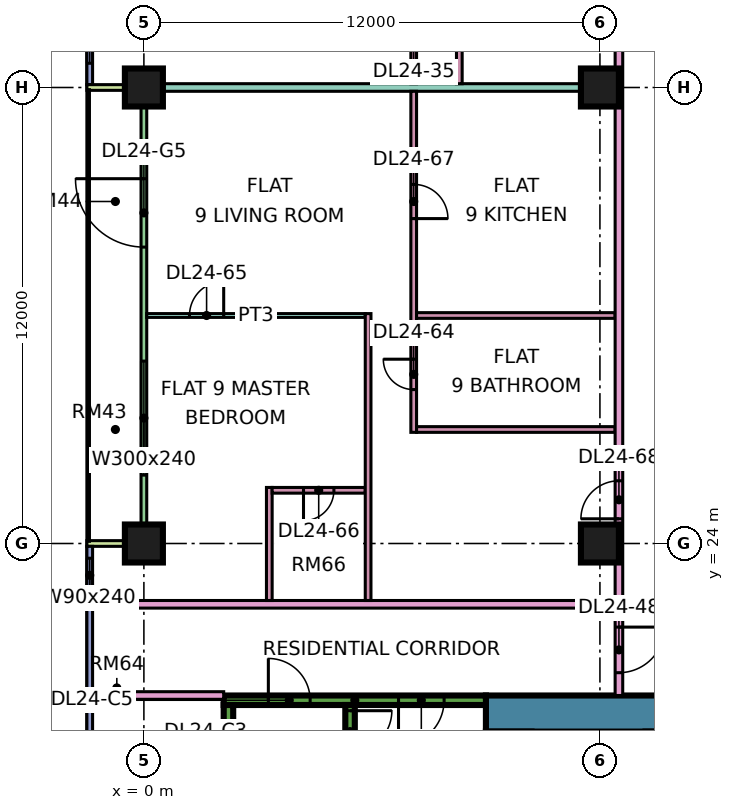
"""IFC4 building model, lengths in metres.
Left out: names, types, materials, properties, quantities, classifications, styles, units other than length and angle.
Written with IfcOpenShell. Run it as: python <this file> out.ifc"""

import sys

from ifc_helpers import new_model, si_unit, direction, frame, frame_2d, origin, origin_2d, place, context, subcontext, project, spatial, rectangle, extrude, element, fill, save


model = new_model("IFC4")
c1 = context("Model", 3, precision=1e-05, world=origin(), true_north=direction((0.0, 1.0)))
c2 = subcontext(c1, "Body", "Model", "MODEL_VIEW")
j1 = project(units=[si_unit("LENGTHUNIT", "METRE"), si_unit("PLANEANGLEUNIT", "RADIAN")], contexts=[c1])
p1 = place(None, origin())
s1 = spatial("IfcSite", under=j1, at=p1, CompositionType="ELEMENT")
p2 = place(p1, origin())
s2 = spatial("IfcBuilding", under=s1, at=p2, CompositionType="ELEMENT")
p3 = place(p2, frame((0.0, 0.0, 106.9)))
s3 = spatial("IfcBuildingStorey", under=s2, at=p3, CompositionType="ELEMENT", Elevation=106.9)
p4 = place(p3, frame((0.0, 24.0, 0.0), z_axis=(0.0, 0.0, 1.0), x_axis=(1.0, 0.0, 0.0)))
e1 = element("IfcColumn", 1, at=p4, inside=s3, PredefinedType="COLUMN", context=c2, shape_type="SweptSolid", body=[
    extrude(rectangle(XDim=1.0, YDim=1.0, at=origin_2d()), origin(), (0.0, 0.0, 1.0), 3.75),
])
p5 = place(p3, frame((0.0, 36.0, 0.0), z_axis=(0.0, 0.0, 1.0), x_axis=(1.0, 0.0, 0.0)))
e2 = element("IfcColumn", 2, at=p5, inside=s3, PredefinedType="COLUMN", context=c2, shape_type="SweptSolid", body=[
    extrude(rectangle(XDim=1.0, YDim=1.0, at=origin_2d()), origin(), (0.0, 0.0, 1.0), 3.75),
])
for number, where, z_axis, x_axis in (
    (3, (12.0, 24.0, 0.0), (0.0, 0.0, 1.0), (1.0, 0.0, 0.0)),
    (4, (12.0, 36.0, 0.0), (0.0, 0.0, 1.0), (1.0, 0.0, 0.0)),
):
    element("IfcColumn", number, at=place(p3, frame(where, z_axis=z_axis, x_axis=x_axis)), inside=s3, PredefinedType="COLUMN", context=c2, shape_type="SweptSolid", body=[
        extrude(rectangle(XDim=1.0, YDim=1.0, at=origin_2d()), origin(), (0.0, 0.0, 1.0), 3.75),
    ])
p6 = place(p3, frame((9.0, 19.525, 0.0), z_axis=(0.0, 0.0, 1.0), x_axis=(1.0, 0.0, 0.0)))
e5 = element("IfcWall", 5, at=p6, inside=s3, PredefinedType="SHEAR", context=c2, shape_type="SweptSolid", body=[
    extrude(rectangle(XDim=25.0, YDim=0.95, at=frame_2d((12.5, 0.0))), origin(), (0.0, 0.0, 1.0), 3.75),
])
p7 = place(p6, frame((19.1, 0.0, 0.0)))
e6 = element("IfcOpeningElement", 6, at=p7, cuts=e5, PredefinedType="OPENING", context=c2, shape_type="SweptSolid", body=[
    extrude(rectangle(XDim=1.8, YDim=2.4, at=frame_2d((0.9, 1.2))), frame((0.0, 0.485, 0.0), z_axis=(0.0, -1.0, 0.0), x_axis=(1.0, 0.0, 0.0)), (0.0, 0.0, 1.0), 0.97),
])
p8 = place(p3, frame((2.1, 19.875, 0.0), z_axis=(0.0, 0.0, 1.0), x_axis=(1.0, 0.0, 0.0)))
e7 = element("IfcWall", 7, at=p8, inside=s3, PredefinedType="SHEAR", context=c2, shape_type="SweptSolid", body=[
    extrude(rectangle(XDim=6.9, YDim=0.25, at=frame_2d((3.45, 0.0))), origin(), (0.0, 0.0, 1.0), 3.75),
])
p9 = place(p8, frame((1.175, 0.0, 0.0)))
e8 = element("IfcOpeningElement", 8, at=p9, cuts=e7, PredefinedType="OPENING", context=c2, shape_type="SweptSolid", body=[
    extrude(rectangle(XDim=1.1, YDim=2.2, at=frame_2d((0.55, 1.1))), frame((0.0, 0.135, 0.0), z_axis=(0.0, -1.0, 0.0), x_axis=(1.0, 0.0, 0.0)), (0.0, 0.0, 1.0), 0.27),
])
p10 = place(p8, frame((4.6, 0.0, 0.0)))
e9 = element("IfcOpeningElement", 9, at=p10, cuts=e7, PredefinedType="OPENING", context=c2, shape_type="SweptSolid", body=[
    extrude(rectangle(XDim=1.2, YDim=2.2, at=frame_2d((0.6, 1.1))), frame((0.0, 0.135, 0.0), z_axis=(0.0, -1.0, 0.0), x_axis=(1.0, 0.0, 0.0)), (0.0, 0.0, 1.0), 0.27),
])
p11 = place(p3, frame((2.225, 13.25, 0.0), z_axis=(0.0, 0.0, 1.0), x_axis=(0.0, 1.0, 0.0)))
e10 = element("IfcWall", 10, at=p11, inside=s3, PredefinedType="SHEAR", context=c2, shape_type="SweptSolid", body=[
    extrude(rectangle(XDim=6.5, YDim=0.25, at=frame_2d((3.25, 0.0))), origin(), (0.0, 0.0, 1.0), 3.75),
])
p12 = place(p3, frame((5.425, 13.25, 0.0), z_axis=(0.0, 0.0, 1.0), x_axis=(0.0, 1.0, 0.0)))
e11 = element("IfcWall", 11, at=p12, inside=s3, PredefinedType="SHEAR", context=c2, shape_type="SweptSolid", body=[
    extrude(rectangle(XDim=6.5, YDim=0.25, at=frame_2d((3.25, 0.0))), origin(), (0.0, 0.0, 1.0), 3.75),
])
p13 = place(p12, frame((5.25, 0.0, 0.0)))
e12 = element("IfcOpeningElement", 12, at=p13, cuts=e11, PredefinedType="OPENING", context=c2, shape_type="SweptSolid", body=[
    extrude(rectangle(XDim=1.1, YDim=2.2, at=frame_2d((0.55, 1.1))), frame((0.0, 0.135, 0.0), z_axis=(0.0, -1.0, 0.0), x_axis=(1.0, 0.0, 0.0)), (0.0, 0.0, 1.0), 0.27),
])
p14 = place(p3, frame((-1.425, 47.925, 0.0), z_axis=(0.0, 0.0, 1.0), x_axis=(0.0, -1.0, 0.0)))
e13 = element("IfcWall", 13, at=p14, inside=s3, PredefinedType="SOLIDWALL", context=c2, shape_type="SweptSolid", body=[
    extrude(rectangle(XDim=11.85, YDim=0.15, at=frame_2d((5.925, 0.0))), origin(), (0.0, 0.0, 1.0), 3.35),
])
p15 = place(p14, frame((0.562, 0.0, 0.45)))
e14 = element("IfcOpeningElement", 14, at=p15, cuts=e13, PredefinedType="OPENING", context=c2, shape_type="SweptSolid", body=[
    extrude(rectangle(XDim=1.8, YDim=2.4, at=frame_2d((0.9, 1.2))), frame((0.0, 0.085, 0.0), z_axis=(0.0, -1.0, 0.0), x_axis=(1.0, 0.0, 0.0)), (0.0, 0.0, 1.0), 0.17),
])
p16 = place(p14, frame((4.425, 0.0, 0.45)))
e15 = element("IfcOpeningElement", 15, at=p16, cuts=e13, PredefinedType="OPENING", context=c2, shape_type="SweptSolid", body=[
    extrude(rectangle(XDim=3.0, YDim=2.4, at=frame_2d((1.5, 1.2))), frame((0.0, 0.085, 0.0), z_axis=(0.0, -1.0, 0.0), x_axis=(1.0, 0.0, 0.0)), (0.0, 0.0, 1.0), 0.17),
])
p17 = place(p14, frame((9.488, 0.0, 0.45)))
e16 = element("IfcOpeningElement", 16, at=p17, cuts=e13, PredefinedType="OPENING", context=c2, shape_type="SweptSolid", body=[
    extrude(rectangle(XDim=1.8, YDim=2.4, at=frame_2d((0.9, 1.2))), frame((0.0, 0.085, 0.0), z_axis=(0.0, -1.0, 0.0), x_axis=(1.0, 0.0, 0.0)), (0.0, 0.0, 1.0), 0.17),
])
p18 = place(p3, frame((0.0, 35.925, 0.0), z_axis=(0.0, 0.0, 1.0), x_axis=(0.0, -1.0, 0.0)))
e17 = element("IfcWall", 17, at=p18, inside=s3, PredefinedType="SOLIDWALL", context=c2, shape_type="SweptSolid", body=[
    extrude(rectangle(XDim=11.85, YDim=0.15, at=frame_2d((5.925, 0.0))), origin(), (0.0, 0.0, 1.0), 3.35),
])
p19 = place(p18, frame((2.325, 0.0, 0.0)))
e18 = element("IfcOpeningElement", 18, at=p19, cuts=e17, PredefinedType="OPENING", context=c2, shape_type="SweptSolid", body=[
    extrude(rectangle(XDim=1.8, YDim=2.4, at=frame_2d((0.9, 1.2))), frame((0.0, 0.085, 0.0), z_axis=(0.0, -1.0, 0.0), x_axis=(1.0, 0.0, 0.0)), (0.0, 0.0, 1.0), 0.17),
])
p20 = place(p18, frame((7.125, 0.0, 0.45)))
e19 = element("IfcOpeningElement", 19, at=p20, cuts=e17, PredefinedType="OPENING", context=c2, shape_type="SweptSolid", body=[
    extrude(rectangle(XDim=3.0, YDim=2.4, at=frame_2d((1.5, 1.2))), frame((0.0, 0.085, 0.0), z_axis=(0.0, -1.0, 0.0), x_axis=(1.0, 0.0, 0.0)), (0.0, 0.0, 1.0), 0.17),
])
for number, where, z_axis, x_axis in (
    (20, (-1.5, 36.0, 0.0), (0.0, 0.0, 1.0), (1.0, 0.0, 0.0)),
    (21, (-1.5, 24.0, 0.0), (0.0, 0.0, 1.0), (1.0, 0.0, 0.0)),
):
    element("IfcWall", number, at=place(p3, frame(where, z_axis=z_axis, x_axis=x_axis)), inside=s3, PredefinedType="SOLIDWALL", context=c2, shape_type="SweptSolid", body=[
        extrude(rectangle(XDim=1.5, YDim=0.15, at=frame_2d((0.75, 0.0))), origin(), (0.0, 0.0, 1.0), 3.35),
    ])
p21 = place(p3, frame((-1.425, 23.925, 0.0), z_axis=(0.0, 0.0, 1.0), x_axis=(0.0, -1.0, 0.0)))
e22 = element("IfcWall", 22, at=p21, inside=s3, PredefinedType="SOLIDWALL", context=c2, shape_type="SweptSolid", body=[
    extrude(rectangle(XDim=11.425, YDim=0.15, at=frame_2d((5.712, 0.0))), origin(), (0.0, 0.0, 1.0), 3.35),
])
p22 = place(p21, frame((0.312, 0.0, 0.45)))
e23 = element("IfcOpeningElement", 23, at=p22, cuts=e22, PredefinedType="OPENING", context=c2, shape_type="SweptSolid", body=[
    extrude(rectangle(XDim=0.9, YDim=2.4, at=frame_2d((0.45, 1.2))), frame((0.0, 0.085, 0.0), z_axis=(0.0, -1.0, 0.0), x_axis=(1.0, 0.0, 0.0)), (0.0, 0.0, 1.0), 0.17),
])
p23 = place(p21, frame((6.175, 0.0, 0.45)))
e24 = element("IfcOpeningElement", 24, at=p23, cuts=e22, PredefinedType="OPENING", context=c2, shape_type="SweptSolid", body=[
    extrude(rectangle(XDim=3.0, YDim=2.4, at=frame_2d((1.5, 1.2))), frame((0.0, 0.085, 0.0), z_axis=(0.0, -1.0, 0.0), x_axis=(1.0, 0.0, 0.0)), (0.0, 0.0, 1.0), 0.17),
])
p24 = place(p3, frame((-1.35, 20.0, 0.0), z_axis=(0.0, 0.0, 1.0), x_axis=(1.0, 0.0, 0.0)))
e25 = element("IfcWall", 25, at=p24, inside=s3, PredefinedType="PARTITIONING", context=c2, shape_type="SweptSolid", body=[
    extrude(rectangle(XDim=3.45, YDim=0.2, at=frame_2d((1.725, 0.0))), origin(), (0.0, 0.0, 1.0), 3.35),
])
p25 = place(p3, frame((-1.35, 22.4, 0.0), z_axis=(0.0, 0.0, 1.0), x_axis=(1.0, 0.0, 0.0)))
e26 = element("IfcWall", 26, at=p25, inside=s3, PredefinedType="PARTITIONING", context=c2, shape_type="SweptSolid", body=[
    extrude(rectangle(XDim=13.75, YDim=0.2, at=frame_2d((6.875, 0.0))), origin(), (0.0, 0.0, 1.0), 3.35),
])
e27 = element("IfcWall", 27, at=p5, inside=s3, PredefinedType="PARTITIONING", context=c2, shape_type="SweptSolid", body=[
    extrude(rectangle(XDim=12.4, YDim=0.2, at=frame_2d((6.2, 0.0))), origin(), (0.0, 0.0, 1.0), 3.35),
])
p26 = place(p3, frame((0.074, 30.0, 0.0), z_axis=(0.0, 0.0, 1.0), x_axis=(1.0, 0.0, 0.0)))
e28 = element("IfcWall", 28, at=p26, inside=s3, PredefinedType="PARTITIONING", context=c2, shape_type="SweptSolid", body=[
    extrude(rectangle(XDim=5.751, YDim=0.1, at=frame_2d((2.875, 0.0))), origin(), (0.0, 0.0, 1.0), 3.35),
])
p27 = place(p26, frame((1.126, 0.0, 0.0)))
e29 = element("IfcOpeningElement", 29, at=p27, cuts=e28, PredefinedType="OPENING", context=c2, shape_type="SweptSolid", body=[
    extrude(rectangle(XDim=0.9, YDim=2.1, at=frame_2d((0.45, 1.05))), frame((0.0, 0.06, 0.0), z_axis=(0.0, -1.0, 0.0), x_axis=(1.0, 0.0, 0.0)), (0.0, 0.0, 1.0), 0.12),
])
p28 = place(p3, frame((3.3, 22.5, 0.0), z_axis=(0.0, 0.0, 1.0), x_axis=(0.0, 1.0, 0.0)))
e30 = element("IfcWall", 30, at=p28, inside=s3, PredefinedType="PARTITIONING", context=c2, shape_type="SweptSolid", body=[
    extrude(rectangle(XDim=2.975, YDim=0.15, at=frame_2d((1.488, 0.0))), origin(), (0.0, 0.0, 1.0), 3.35),
])
p29 = place(p3, frame((3.375, 25.4, 0.0), z_axis=(0.0, 0.0, 1.0), x_axis=(1.0, 0.0, 0.0)))
e31 = element("IfcWall", 31, at=p29, inside=s3, PredefinedType="PARTITIONING", context=c2, shape_type="SweptSolid", body=[
    extrude(rectangle(XDim=2.45, YDim=0.15, at=frame_2d((1.225, 0.0))), origin(), (0.0, 0.0, 1.0), 3.35),
])
p30 = place(p29, frame((0.825, 0.0, 0.0)))
e32 = element("IfcOpeningElement", 32, at=p30, cuts=e31, PredefinedType="OPENING", context=c2, shape_type="SweptSolid", body=[
    extrude(rectangle(XDim=0.8, YDim=2.1, at=frame_2d((0.4, 1.05))), frame((0.0, 0.085, 0.0), z_axis=(0.0, -1.0, 0.0), x_axis=(1.0, 0.0, 0.0)), (0.0, 0.0, 1.0), 0.17),
])
p31 = place(p3, frame((5.9, 22.5, 0.0), z_axis=(0.0, 0.0, 1.0), x_axis=(0.0, 1.0, 0.0)))
e33 = element("IfcWall", 33, at=p31, inside=s3, PredefinedType="PARTITIONING", context=c2, shape_type="SweptSolid", body=[
    extrude(rectangle(XDim=7.55, YDim=0.15, at=frame_2d((3.775, 0.0))), origin(), (0.0, 0.0, 1.0), 3.35),
])
p32 = place(p3, frame((7.1, 26.925, 0.0), z_axis=(0.0, 0.0, 1.0), x_axis=(0.0, 1.0, 0.0)))
e34 = element("IfcWall", 34, at=p32, inside=s3, PredefinedType="PARTITIONING", context=c2, shape_type="SweptSolid", body=[
    extrude(rectangle(XDim=8.975, YDim=0.15, at=frame_2d((4.487, 0.0))), origin(), (0.0, 0.0, 1.0), 3.35),
])
p33 = place(p32, frame((1.125, 0.0, 0.0)))
e35 = element("IfcOpeningElement", 35, at=p33, cuts=e34, PredefinedType="OPENING", context=c2, shape_type="SweptSolid", body=[
    extrude(rectangle(XDim=0.8, YDim=2.1, at=frame_2d((0.4, 1.05))), frame((0.0, 0.085, 0.0), z_axis=(0.0, -1.0, 0.0), x_axis=(1.0, 0.0, 0.0)), (0.0, 0.0, 1.0), 0.17),
])
p34 = place(p32, frame((5.625, 0.0, 0.0)))
e36 = element("IfcOpeningElement", 36, at=p34, cuts=e34, PredefinedType="OPENING", context=c2, shape_type="SweptSolid", body=[
    extrude(rectangle(XDim=0.9, YDim=2.1, at=frame_2d((0.45, 1.05))), frame((0.0, 0.085, 0.0), z_axis=(0.0, -1.0, 0.0), x_axis=(1.0, 0.0, 0.0)), (0.0, 0.0, 1.0), 0.17),
])
p35 = place(p3, frame((7.1, 36.1, 0.0), z_axis=(0.0, 0.0, 1.0), x_axis=(0.0, 1.0, 0.0)))
e37 = element("IfcWall", 37, at=p35, inside=s3, PredefinedType="PARTITIONING", context=c2, shape_type="SweptSolid", body=[
    extrude(rectangle(XDim=8.95, YDim=0.15, at=frame_2d((4.475, 0.0))), origin(), (0.0, 0.0, 1.0), 3.35),
])
p36 = place(p35, frame((0.95, 0.0, 0.0)))
e38 = element("IfcOpeningElement", 38, at=p36, cuts=e37, PredefinedType="OPENING", context=c2, shape_type="SweptSolid", body=[
    extrude(rectangle(XDim=0.9, YDim=2.1, at=frame_2d((0.45, 1.05))), frame((0.0, 0.085, 0.0), z_axis=(0.0, -1.0, 0.0), x_axis=(1.0, 0.0, 0.0)), (0.0, 0.0, 1.0), 0.17),
])
p37 = place(p35, frame((6.95, 0.0, 0.0)))
e39 = element("IfcOpeningElement", 39, at=p37, cuts=e37, PredefinedType="OPENING", context=c2, shape_type="SweptSolid", body=[
    extrude(rectangle(XDim=0.9, YDim=2.1, at=frame_2d((0.45, 1.05))), frame((0.0, 0.085, 0.0), z_axis=(0.0, -1.0, 0.0), x_axis=(1.0, 0.0, 0.0)), (0.0, 0.0, 1.0), 0.17),
])
for number, where, z_axis, x_axis in (
    (40, (7.175, 27.0, 0.0), (0.0, 0.0, 1.0), (1.0, 0.0, 0.0)),
    (41, (7.175, 30.0, 0.0), (0.0, 0.0, 1.0), (1.0, 0.0, 0.0)),
):
    element("IfcWall", number, at=place(p3, frame(where, z_axis=z_axis, x_axis=x_axis)), inside=s3, PredefinedType="PARTITIONING", context=c2, shape_type="SweptSolid", body=[
        extrude(rectangle(XDim=5.225, YDim=0.15, at=frame_2d((2.612, 0.0))), origin(), (0.0, 0.0, 1.0), 3.35),
    ])
p38 = place(p3, frame((8.3, 36.1, 0.0), z_axis=(0.0, 0.0, 1.0), x_axis=(0.0, 1.0, 0.0)))
e42 = element("IfcWall", 42, at=p38, inside=s3, PredefinedType="PARTITIONING", context=c2, shape_type="SweptSolid", body=[
    extrude(rectangle(XDim=8.975, YDim=0.15, at=frame_2d((4.487, 0.0))), origin(), (0.0, 0.0, 1.0), 3.35),
])
p39 = place(p38, frame((2.6, 0.0, 0.0)))
e43 = element("IfcOpeningElement", 43, at=p39, cuts=e42, PredefinedType="OPENING", context=c2, shape_type="SweptSolid", body=[
    extrude(rectangle(XDim=0.9, YDim=2.1, at=frame_2d((0.45, 1.05))), frame((0.0, 0.085, 0.0), z_axis=(0.0, -1.0, 0.0), x_axis=(1.0, 0.0, 0.0)), (0.0, 0.0, 1.0), 0.17),
])
p40 = place(p3, frame((12.5, 20.0, 0.0), z_axis=(0.0, 0.0, 1.0), x_axis=(0.0, 1.0, 0.0)))
e44 = element("IfcWall", 44, at=p40, inside=s3, PredefinedType="PARTITIONING", context=c2, shape_type="SweptSolid", body=[
    extrude(rectangle(XDim=43.0, YDim=0.2, at=frame_2d((21.5, 0.0))), origin(), (0.0, 0.0, 1.0), 3.35),
])
p41 = place(p40, frame((25.95, 0.0, 0.0)))
e45 = element("IfcOpeningElement", 45, at=p41, cuts=e44, PredefinedType="OPENING", context=c2, shape_type="SweptSolid", body=[
    extrude(rectangle(XDim=1.0, YDim=2.1, at=frame_2d((0.5, 1.05))), frame((0.0, 0.11, 0.0), z_axis=(0.0, -1.0, 0.0), x_axis=(1.0, 0.0, 0.0)), (0.0, 0.0, 1.0), 0.22),
])
p42 = place(p40, frame((29.25, 0.0, 0.0)))
e46 = element("IfcOpeningElement", 46, at=p42, cuts=e44, PredefinedType="OPENING", context=c2, shape_type="SweptSolid", body=[
    extrude(rectangle(XDim=1.0, YDim=2.1, at=frame_2d((0.5, 1.05))), frame((0.0, 0.11, 0.0), z_axis=(0.0, -1.0, 0.0), x_axis=(1.0, 0.0, 0.0)), (0.0, 0.0, 1.0), 0.22),
])
p43 = place(p40, frame((0.6, 0.0, 0.0)))
e47 = element("IfcOpeningElement", 47, at=p43, cuts=e44, PredefinedType="OPENING", context=c2, shape_type="SweptSolid", body=[
    extrude(rectangle(XDim=1.2, YDim=2.1, at=frame_2d((0.6, 1.05))), frame((0.0, 0.11, 0.0), z_axis=(0.0, -1.0, 0.0), x_axis=(1.0, 0.0, 0.0)), (0.0, 0.0, 1.0), 0.22),
])
p44 = place(p40, frame((4.65, 0.0, 0.0)))
e48 = element("IfcOpeningElement", 48, at=p44, cuts=e44, PredefinedType="OPENING", context=c2, shape_type="SweptSolid", body=[
    extrude(rectangle(XDim=1.0, YDim=2.1, at=frame_2d((0.5, 1.05))), frame((0.0, 0.11, 0.0), z_axis=(0.0, -1.0, 0.0), x_axis=(1.0, 0.0, 0.0)), (0.0, 0.0, 1.0), 0.22),
])
p45 = place(p17, origin())
e49 = element("IfcWindow", 49, at=p45, inside=s3, PartitioningType="SINGLE_PANEL", PredefinedType="WINDOW", context=c2, shape_type="SweptSolid", body=[
    extrude(rectangle(XDim=1.8, YDim=2.4, at=frame_2d((0.9, 1.2))), frame((0.0, 0.03, 0.0), z_axis=(0.0, -1.0, 0.0), x_axis=(1.0, 0.0, 0.0)), (0.0, 0.0, 1.0), 0.06),
])
fill(e16, e49)
p46 = place(p19, frame((1.8, 0.0, 0.0), z_axis=(0.0, 0.0, 1.0), x_axis=(-1.0, 0.0, 0.0)))
e50 = element("IfcDoor", 50, at=p46, inside=s3, OperationType="DOUBLE_DOOR_SINGLE_SWING", PredefinedType="DOOR", context=c2, shape_type="SweptSolid", body=[
    extrude(rectangle(XDim=1.8, YDim=2.4, at=frame_2d((0.9, 1.2))), frame((0.0, 0.025, 0.0), z_axis=(0.0, -1.0, 0.0), x_axis=(1.0, 0.0, 0.0)), (0.0, 0.0, 1.0), 0.05),
])
fill(e18, e50)
p47 = place(p20, origin())
e51 = element("IfcWindow", 51, at=p47, inside=s3, PartitioningType="SINGLE_PANEL", PredefinedType="WINDOW", context=c2, shape_type="SweptSolid", body=[
    extrude(rectangle(XDim=3.0, YDim=2.4, at=frame_2d((1.5, 1.2))), frame((0.0, 0.03, 0.0), z_axis=(0.0, -1.0, 0.0), x_axis=(1.0, 0.0, 0.0)), (0.0, 0.0, 1.0), 0.06),
])
fill(e19, e51)
p48 = place(p22, origin())
e52 = element("IfcWindow", 52, at=p48, inside=s3, PartitioningType="SINGLE_PANEL", PredefinedType="WINDOW", context=c2, shape_type="SweptSolid", body=[
    extrude(rectangle(XDim=0.9, YDim=2.4, at=frame_2d((0.45, 1.2))), frame((0.0, 0.03, 0.0), z_axis=(0.0, -1.0, 0.0), x_axis=(1.0, 0.0, 0.0)), (0.0, 0.0, 1.0), 0.06),
])
fill(e23, e52)
p49 = place(p13, origin())
e53 = element("IfcDoor", 53, at=p49, inside=s3, OperationType="SINGLE_SWING_RIGHT", PredefinedType="DOOR", context=c2, shape_type="SweptSolid", body=[
    extrude(rectangle(XDim=1.1, YDim=2.2, at=frame_2d((0.55, 1.1))), frame((0.0, 0.025, 0.0), z_axis=(0.0, -1.0, 0.0), x_axis=(1.0, 0.0, 0.0)), (0.0, 0.0, 1.0), 0.05),
])
fill(e12, e53)
p50 = place(p9, origin())
e54 = element("IfcDoor", 54, at=p50, inside=s3, OperationType="SINGLE_SWING_LEFT", PredefinedType="DOOR", context=c2, shape_type="SweptSolid", body=[
    extrude(rectangle(XDim=1.1, YDim=2.2, at=frame_2d((0.55, 1.1))), frame((0.0, 0.025, 0.0), z_axis=(0.0, -1.0, 0.0), x_axis=(1.0, 0.0, 0.0)), (0.0, 0.0, 1.0), 0.05),
])
fill(e8, e54)
p51 = place(p10, frame((1.2, 0.0, 0.0), z_axis=(0.0, 0.0, 1.0), x_axis=(-1.0, 0.0, 0.0)))
e55 = element("IfcDoor", 55, at=p51, inside=s3, OperationType="SINGLE_SWING_LEFT", PredefinedType="DOOR", context=c2, shape_type="SweptSolid", body=[
    extrude(rectangle(XDim=1.2, YDim=2.2, at=frame_2d((0.6, 1.1))), frame((0.0, 0.025, 0.0), z_axis=(0.0, -1.0, 0.0), x_axis=(1.0, 0.0, 0.0)), (0.0, 0.0, 1.0), 0.05),
])
fill(e9, e55)
p52 = place(p43, origin())
e56 = element("IfcDoor", 56, at=p52, inside=s3, OperationType="SINGLE_SWING_RIGHT", PredefinedType="DOOR", context=c2, shape_type="SweptSolid", body=[
    extrude(rectangle(XDim=1.2, YDim=2.1, at=frame_2d((0.6, 1.05))), frame((0.0, 0.025, 0.0), z_axis=(0.0, -1.0, 0.0), x_axis=(1.0, 0.0, 0.0)), (0.0, 0.0, 1.0), 0.05),
])
fill(e47, e56)
p53 = place(p33, frame((0.8, 0.0, 0.0), z_axis=(0.0, 0.0, 1.0), x_axis=(-1.0, 0.0, 0.0)))
e57 = element("IfcDoor", 57, at=p53, inside=s3, OperationType="SINGLE_SWING_RIGHT", PredefinedType="DOOR", context=c2, shape_type="SweptSolid", body=[
    extrude(rectangle(XDim=0.8, YDim=2.1, at=frame_2d((0.4, 1.05))), frame((0.0, 0.025, 0.0), z_axis=(0.0, -1.0, 0.0), x_axis=(1.0, 0.0, 0.0)), (0.0, 0.0, 1.0), 0.05),
])
fill(e35, e57)
p54 = place(p27, frame((0.9, 0.0, 0.0), z_axis=(0.0, 0.0, 1.0), x_axis=(-1.0, 0.0, 0.0)))
e58 = element("IfcDoor", 58, at=p54, inside=s3, OperationType="SINGLE_SWING_RIGHT", PredefinedType="DOOR", context=c2, shape_type="SweptSolid", body=[
    extrude(rectangle(XDim=0.9, YDim=2.1, at=frame_2d((0.45, 1.05))), frame((0.0, 0.025, 0.0), z_axis=(0.0, -1.0, 0.0), x_axis=(1.0, 0.0, 0.0)), (0.0, 0.0, 1.0), 0.05),
])
fill(e29, e58)
p55 = place(p30, frame((0.8, 0.0, 0.0), z_axis=(0.0, 0.0, 1.0), x_axis=(-1.0, 0.0, 0.0)))
e59 = element("IfcDoor", 59, at=p55, inside=s3, OperationType="SINGLE_SWING_LEFT", PredefinedType="DOOR", context=c2, shape_type="SweptSolid", body=[
    extrude(rectangle(XDim=0.8, YDim=2.1, at=frame_2d((0.4, 1.05))), frame((0.0, 0.025, 0.0), z_axis=(0.0, -1.0, 0.0), x_axis=(1.0, 0.0, 0.0)), (0.0, 0.0, 1.0), 0.05),
])
fill(e32, e59)
p56 = place(p34, frame((0.9, 0.0, 0.0), z_axis=(0.0, 0.0, 1.0), x_axis=(-1.0, 0.0, 0.0)))
e60 = element("IfcDoor", 60, at=p56, inside=s3, OperationType="SINGLE_SWING_LEFT", PredefinedType="DOOR", context=c2, shape_type="SweptSolid", body=[
    extrude(rectangle(XDim=0.9, YDim=2.1, at=frame_2d((0.45, 1.05))), frame((0.0, 0.025, 0.0), z_axis=(0.0, -1.0, 0.0), x_axis=(1.0, 0.0, 0.0)), (0.0, 0.0, 1.0), 0.05),
])
fill(e36, e60)
p57 = place(p44, origin())
e61 = element("IfcDoor", 61, at=p57, inside=s3, OperationType="SINGLE_SWING_LEFT", PredefinedType="DOOR", context=c2, shape_type="SweptSolid", body=[
    extrude(rectangle(XDim=1.0, YDim=2.1, at=frame_2d((0.5, 1.05))), frame((0.0, 0.025, 0.0), z_axis=(0.0, -1.0, 0.0), x_axis=(1.0, 0.0, 0.0)), (0.0, 0.0, 1.0), 0.05),
])
fill(e48, e61)
save(model, sys.argv[1])
